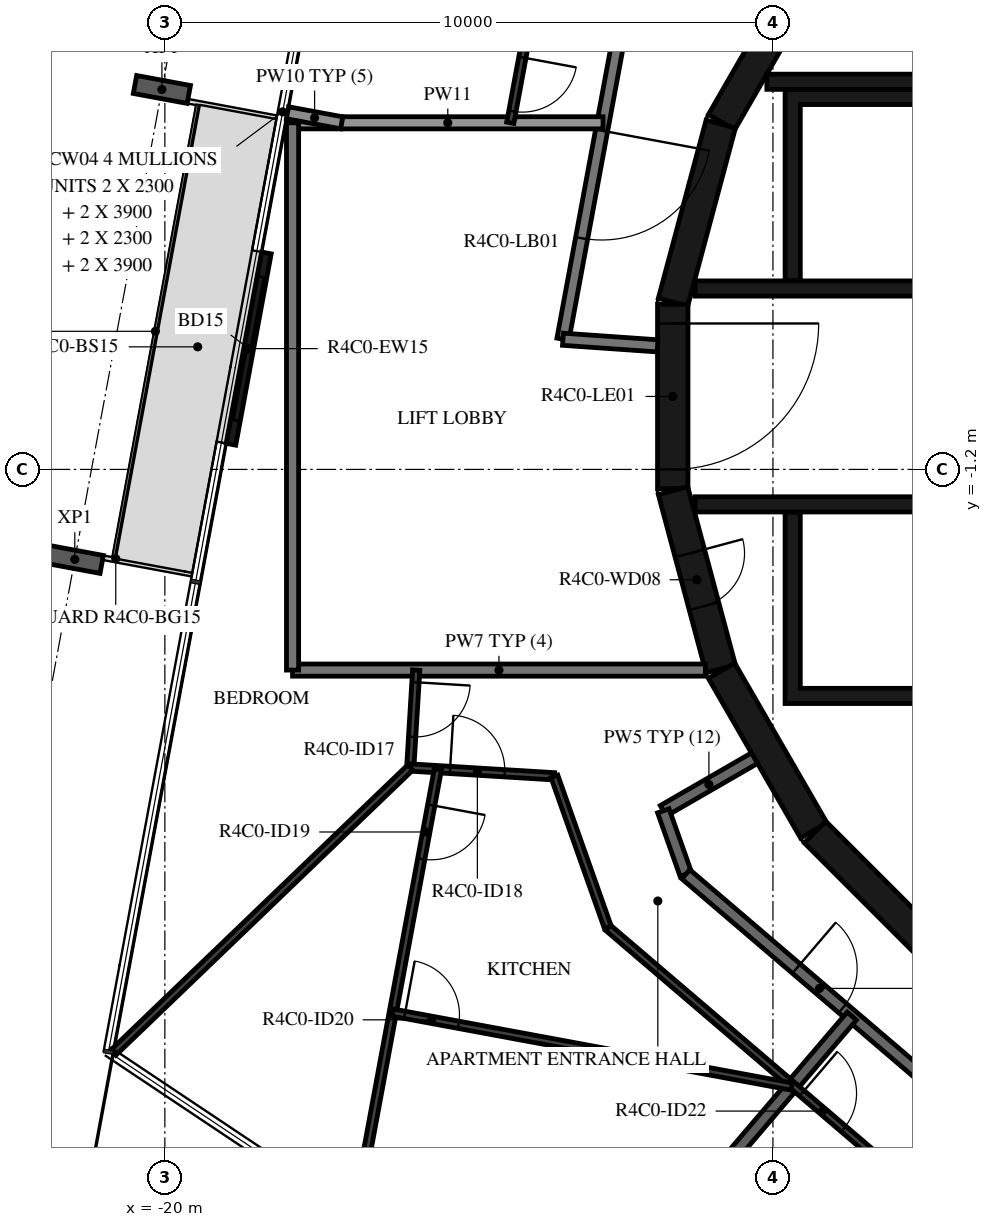
"""IFC4 building model, lengths in metres.
Left out: names, types, materials, properties, quantities, classifications, styles, units other than length and angle.
Written with IfcOpenShell. Run it as: python <this file> out.ifc"""

import sys

from ifc_helpers import new_model, si_unit, direction, frame, frame_2d, origin, origin_2d, place, context, subcontext, project, spatial, polyline, rectangle, i_section, outline, extrude, element, fill, save


model = new_model("IFC4")
c1 = context("Model", 3, precision=1e-05, world=origin(), true_north=direction((0.0, 1.0)))
c2 = subcontext(c1, "Body", "Model", "MODEL_VIEW")
j1 = project(units=[si_unit("LENGTHUNIT", "METRE"), si_unit("PLANEANGLEUNIT", "RADIAN")], contexts=[c1])
p1 = place(None, origin())
s1 = spatial("IfcSite", under=j1, at=p1, CompositionType="ELEMENT")
p2 = place(p1, origin())
s2 = spatial("IfcBuilding", under=s1, at=p2, CompositionType="ELEMENT")
p3 = place(p2, frame((0.0, 0.0, 172.7)))
s3 = spatial("IfcBuildingStorey", under=s2, at=p3, CompositionType="ELEMENT", Elevation=172.7)
for number, where, z_axis, x_axis in (
    (1, (-20.049, 5.048, -0.38), (0.0, 0.0, 1.0), (0.182, 0.983, 0.0)),
    (2, (-21.481, -2.68, -0.38), (0.0, 0.0, 1.0), (0.182, 0.983, 0.0)),
):
    element("IfcColumn", number, at=place(p3, frame(where, z_axis=z_axis, x_axis=x_axis)), inside=s3, PredefinedType="COLUMN", context=c2, shape_type="SweptSolid", body=[
        extrude(i_section(OverallWidth=0.3, OverallDepth=0.9, WebThickness=0.019, FlangeThickness=0.035, FilletRadius=0.03, at=origin_2d()), origin(), (0.0, 0.0, 1.0), 3.5),
    ])
p4 = place(p3, frame((-18.33, 2.36, 0.0), z_axis=(0.0, 0.0, 1.0), x_axis=(-0.18226136951, -0.983250117307, 0.0)))
e3 = element("IfcWall", 3, at=p4, inside=s3, PredefinedType="STANDARD", context=c2, shape_type="SweptSolid", body=[
    extrude(rectangle(XDim=3.2, YDim=0.16, at=frame_2d((1.6, 0.0))), origin(), (0.0, 0.0, 1.0), 3.12),
])
p5 = place(p4, frame((0.4, 0.0, 0.0)))
e4 = element("IfcOpeningElement", 4, at=p5, cuts=e3, PredefinedType="OPENING", context=c2, shape_type="SweptSolid", body=[
    extrude(rectangle(XDim=2.4, YDim=2.4, at=frame_2d((1.2, 1.2))), frame((0.0, 0.09, 0.0), z_axis=(0.0, -1.0, 0.0), x_axis=(1.0, 0.0, 0.0)), (0.0, 0.0, 1.0), 0.18),
])
for number, where, z_axis, x_axis in (
    (5, (-9.329, 7.137, 0.0), (0.0, 0.0, 1.0), (-0.5, -0.866, 0.0)),
    (6, (-10.858, 4.479, 0.0), (0.0, 0.0, 1.0), (-0.259, -0.966, 0.0)),
):
    element("IfcWall", number, at=place(p3, frame(where, z_axis=z_axis, x_axis=x_axis)), inside=s3, PredefinedType="SHEAR", context=c2, shape_type="SweptSolid", body=[
        extrude(rectangle(XDim=3.033, YDim=0.5, at=frame_2d((1.516, 0.0))), origin(), (0.0, 0.0, 1.0), 3.12),
    ])
p6 = place(p3, frame((-11.647, 1.516, 0.0), z_axis=(0.0, 0.0, 1.0), x_axis=(0.0, -1.0, 0.0)))
e7 = element("IfcWall", 7, at=p6, inside=s3, PredefinedType="SHEAR", context=c2, shape_type="SweptSolid", body=[
    extrude(rectangle(XDim=3.033, YDim=0.5, at=frame_2d((1.516, 0.0))), origin(), (0.0, 0.0, 1.0), 3.12),
])
p7 = place(p6, frame((0.316, 0.0, 0.0)))
e8 = element("IfcOpeningElement", 8, at=p7, cuts=e7, PredefinedType="OPENING", context=c2, shape_type="SweptSolid", body=[
    extrude(rectangle(XDim=2.4, YDim=2.1, at=frame_2d((1.2, 1.05))), frame((0.0, 0.26, 0.0), z_axis=(0.0, -1.0, 0.0), x_axis=(1.0, 0.0, 0.0)), (0.0, 0.0, 1.0), 0.52),
])
p8 = place(p3, frame((-11.643, -1.55, 0.0), z_axis=(0.0, 0.0, 1.0), x_axis=(0.258734743916, -0.965948410781, 0.0)))
e9 = element("IfcWall", 9, at=p8, inside=s3, PredefinedType="SHEAR", context=c2, shape_type="SweptSolid", body=[
    extrude(rectangle(XDim=3.033, YDim=0.5, at=frame_2d((1.516, 0.0))), origin(), (0.0, 0.0, 1.0), 3.12),
])
p9 = place(p8, frame((1.066, 0.0, 0.0)))
e10 = element("IfcOpeningElement", 10, at=p9, cuts=e9, PredefinedType="OPENING", context=c2, shape_type="SweptSolid", body=[
    extrude(rectangle(XDim=0.9, YDim=2.1, at=frame_2d((0.45, 1.05))), frame((0.0, 0.26, 0.0), z_axis=(0.0, -1.0, 0.0), x_axis=(1.0, 0.0, 0.0)), (0.0, 0.0, 1.0), 0.52),
])
p10 = place(p3, frame((-10.845, -4.51, 0.0), z_axis=(0.0, 0.0, 1.0), x_axis=(0.500087131594, -0.865975092491, 0.0)))
e11 = element("IfcWall", 11, at=p10, inside=s3, PredefinedType="SHEAR", context=c2, shape_type="SweptSolid", body=[
    extrude(rectangle(XDim=3.033, YDim=0.5, at=frame_2d((1.516, 0.0))), origin(), (0.0, 0.0, 1.0), 3.12),
])
p11 = place(p3, frame((-9.308, -7.164, 0.0), z_axis=(0.0, 0.0, 1.0), x_axis=(0.707106781187, -0.707106781187, 0.0)))
e12 = element("IfcWall", 12, at=p11, inside=s3, PredefinedType="SHEAR", context=c2, shape_type="SweptSolid", body=[
    extrude(rectangle(XDim=3.032, YDim=0.5, at=frame_2d((1.516, 0.0))), origin(), (0.0, 0.0, 1.0), 3.12),
])
p12 = place(p3, frame((-7.0, 5.175, 0.0), z_axis=(0.0, 0.0, 1.0), x_axis=(-1.0, 0.0, 0.0)))
e13 = element("IfcWall", 13, at=p12, inside=s3, PredefinedType="SHEAR", context=c2, shape_type="SweptSolid", body=[
    extrude(rectangle(XDim=3.1, YDim=0.25, at=frame_2d((1.55, 0.0))), origin(), (0.0, 0.0, 1.0), 3.12),
])
p13 = place(p3, origin())
e14 = element("IfcWall", 14, at=p13, inside=s3, PredefinedType="SHEAR", context=c2, shape_type="SweptSolid", body=[
    extrude(outline(polyline([(-9.55, 4.8), (-1.2, 4.8), (-1.2, 1.9), (-0.95, 1.9), (-0.95, 4.8), (0.95, 4.8), (0.95, 1.9), (1.2, 1.9), (1.2, 4.8), (3.1, 4.8), (3.1, 1.9), (3.35, 1.9), (3.35, 4.8), (5.25, 4.8), (5.25, 1.9), (5.5, 1.9), (5.5, 4.8), (7.4, 4.8), (7.4, 1.9), (7.65, 1.9), (7.65, 4.8), (9.55, 4.8), (9.55, 1.9), (9.8, 1.9), (9.8, 4.8), (9.8, 5.05), (-9.8, 5.05), (-9.8, 4.8), (-9.8, 1.9), (-9.55, 1.9), (-9.55, 4.8)])), origin(), (0.0, 0.0, 1.0), 3.12),
])
p14 = place(p3, origin())
e15 = element("IfcWall", 15, at=p14, inside=s3, PredefinedType="SHEAR", context=c2, shape_type="SweptSolid", body=[
    extrude(outline(polyline([(9.8, -5.05), (9.8, -4.8), (9.8, -1.9), (9.55, -1.9), (9.55, -4.8), (7.65, -4.8), (7.65, -1.9), (7.4, -1.9), (7.4, -4.8), (5.5, -4.8), (5.5, -1.9), (5.25, -1.9), (5.25, -4.8), (3.35, -4.8), (3.35, -1.9), (3.1, -1.9), (3.1, -4.8), (1.2, -4.8), (1.2, -1.9), (0.95, -1.9), (0.95, -4.8), (-5.25, -4.8), (-5.25, -1.9), (-5.5, -1.9), (-5.5, -4.8), (-7.4, -4.8), (-7.4, -1.9), (-7.65, -1.9), (-7.65, -4.8), (-9.55, -4.8), (-9.55, -1.9), (-9.8, -1.9), (-9.8, -4.8), (-9.8, -5.05), (9.8, -5.05)])), origin(), (0.0, 0.0, 1.0), 3.12),
])
p15 = place(p3, frame((-11.28, 1.775, 0.0), z_axis=(0.0, 0.0, 1.0), x_axis=(1.0, 0.0, 0.0)))
e16 = element("IfcWall", 16, at=p15, inside=s3, PredefinedType="SHEAR", context=c2, shape_type="SweptSolid", body=[
    extrude(rectangle(XDim=14.38, YDim=0.25, at=frame_2d((7.19, 0.0))), origin(), (0.0, 0.0, 1.0), 3.12),
])
p16 = place(p15, frame((10.73, 0.0, 0.0)))
e17 = element("IfcOpeningElement", 17, at=p16, cuts=e16, PredefinedType="OPENING", context=c2, shape_type="SweptSolid", body=[
    extrude(rectangle(XDim=1.1, YDim=2.1, at=frame_2d((0.55, 1.05))), frame((0.0, 0.135, 0.0), z_axis=(0.0, -1.0, 0.0), x_axis=(1.0, 0.0, 0.0)), (0.0, 0.0, 1.0), 0.27),
])
p17 = place(p15, frame((12.88, 0.0, 0.0)))
e18 = element("IfcOpeningElement", 18, at=p17, cuts=e16, PredefinedType="OPENING", context=c2, shape_type="SweptSolid", body=[
    extrude(rectangle(XDim=1.1, YDim=2.1, at=frame_2d((0.55, 1.05))), frame((0.0, 0.135, 0.0), z_axis=(0.0, -1.0, 0.0), x_axis=(1.0, 0.0, 0.0)), (0.0, 0.0, 1.0), 0.27),
])
p18 = place(p15, frame((5.455, 0.0, 0.0)))
e19 = element("IfcOpeningElement", 19, at=p18, cuts=e16, PredefinedType="OPENING", context=c2, shape_type="SweptSolid", body=[
    extrude(rectangle(XDim=0.9, YDim=2.1, at=frame_2d((0.45, 1.05))), frame((0.0, 0.135, 0.0), z_axis=(0.0, -1.0, 0.0), x_axis=(1.0, 0.0, 0.0)), (0.0, 0.0, 1.0), 0.27),
])
p19 = place(p3, frame((-11.28, -1.775, 0.0), z_axis=(0.0, 0.0, 1.0), x_axis=(1.0, 0.0, 0.0)))
e20 = element("IfcWall", 20, at=p19, inside=s3, PredefinedType="SHEAR", context=c2, shape_type="SweptSolid", body=[
    extrude(rectangle(XDim=14.38, YDim=0.25, at=frame_2d((7.19, 0.0))), origin(), (0.0, 0.0, 1.0), 3.12),
])
p20 = place(p19, frame((12.88, 0.0, 0.0)))
e21 = element("IfcOpeningElement", 21, at=p20, cuts=e20, PredefinedType="OPENING", context=c2, shape_type="SweptSolid", body=[
    extrude(rectangle(XDim=1.1, YDim=2.1, at=frame_2d((0.55, 1.05))), frame((0.0, 0.135, 0.0), z_axis=(0.0, -1.0, 0.0), x_axis=(1.0, 0.0, 0.0)), (0.0, 0.0, 1.0), 0.27),
])
p21 = place(p19, frame((8.68, 0.0, 0.0)))
e22 = element("IfcOpeningElement", 22, at=p21, cuts=e20, PredefinedType="OPENING", context=c2, shape_type="SweptSolid", body=[
    extrude(rectangle(XDim=0.9, YDim=2.1, at=frame_2d((0.45, 1.05))), frame((0.0, 0.135, 0.0), z_axis=(0.0, -1.0, 0.0), x_axis=(1.0, 0.0, 0.0)), (0.0, 0.0, 1.0), 0.27),
])
p22 = place(p3, frame((-12.521, 5.972, 0.0), z_axis=(0.0, 0.0, 1.0), x_axis=(-0.182251559718, -0.983251935661, 0.0)))
e23 = element("IfcWall", 23, at=p22, inside=s3, PredefinedType="STANDARD", context=c2, shape_type="SweptSolid", body=[
    extrude(rectangle(XDim=5.117, YDim=0.2, at=frame_2d((2.559, 0.0))), origin(), (0.0, 0.0, 1.0), 3.12),
])
p23 = place(p22, frame((1.627, 0.0, 0.0)))
e24 = element("IfcOpeningElement", 24, at=p23, cuts=e23, PredefinedType="OPENING", context=c2, shape_type="SweptSolid", body=[
    extrude(rectangle(XDim=1.8, YDim=2.1, at=frame_2d((0.9, 1.05))), frame((0.0, 0.11, 0.0), z_axis=(0.0, -1.0, 0.0), x_axis=(1.0, 0.0, 0.0)), (0.0, 0.0, 1.0), 0.22),
])
p24 = place(p3, frame((-13.454, 0.941, 0.0), z_axis=(0.0, 0.0, 1.0), x_axis=(0.99755155062, -0.069934997354, 0.0)))
e25 = element("IfcWall", 25, at=p24, inside=s3, PredefinedType="STANDARD", context=c2, shape_type="SweptSolid", body=[
    extrude(rectangle(XDim=1.561, YDim=0.2, at=frame_2d((0.78, 0.0))), origin(), (0.0, 0.0, 1.0), 3.12),
])
p25 = place(p3, frame((-10.303, -5.949, 0.0), z_axis=(0.0, 0.0, 1.0), x_axis=(-0.866021168401, -0.500007335828, 0.0)))
e26 = element("IfcWall", 26, at=p25, inside=s3, PredefinedType="STANDARD", context=c2, shape_type="SweptSolid", body=[
    extrude(rectangle(XDim=1.731, YDim=0.2, at=frame_2d((0.865, 0.0))), origin(), (0.0, 0.0, 1.0), 3.12),
])
p26 = place(p3, frame((-11.802, -6.814, 0.0), z_axis=(0.0, 0.0, 1.0), x_axis=(0.333904297771, -0.942606980629, 0.0)))
e27 = element("IfcWall", 27, at=p26, inside=s3, PredefinedType="STANDARD", context=c2, shape_type="SweptSolid", body=[
    extrude(rectangle(XDim=1.107, YDim=0.2, at=frame_2d((0.553, 0.0))), origin(), (0.0, 0.0, 1.0), 3.12),
])
p27 = place(p3, frame((-11.433, -7.858, 0.0), z_axis=(0.0, 0.0, 1.0), x_axis=(0.760412154545, -0.649440801937, 0.0)))
e28 = element("IfcWall", 28, at=p27, inside=s3, PredefinedType="STANDARD", context=c2, shape_type="SweptSolid", body=[
    extrude(rectangle(XDim=7.181, YDim=0.2, at=frame_2d((3.59, 0.0))), origin(), (0.0, 0.0, 1.0), 3.12),
])
p28 = place(p27, frame((2.39, 0.0, 0.0)))
e29 = element("IfcOpeningElement", 29, at=p28, cuts=e28, PredefinedType="OPENING", context=c2, shape_type="SweptSolid", body=[
    extrude(rectangle(XDim=1.0, YDim=2.1, at=frame_2d((0.5, 1.05))), frame((0.0, 0.11, 0.0), z_axis=(0.0, -1.0, 0.0), x_axis=(1.0, 0.0, 0.0)), (0.0, 0.0, 1.0), 0.22),
])
p29 = place(p3, frame((-12.794, 4.5, 0.0), z_axis=(0.0, 0.0, 1.0), x_axis=(-1.0, 0.0, 0.0)))
e30 = element("IfcWall", 30, at=p29, inside=s3, PredefinedType="STANDARD", context=c2, shape_type="SweptSolid", body=[
    extrude(rectangle(XDim=5.106, YDim=0.2, at=frame_2d((2.553, 0.0))), origin(), (0.0, 0.0, 1.0), 2.73),
])
p30 = place(p3, frame((-17.9, -4.5, 0.0), z_axis=(0.0, 0.0, 1.0), x_axis=(1.0, 0.0, 0.0)))
e31 = element("IfcWall", 31, at=p30, inside=s3, PredefinedType="STANDARD", context=c2, shape_type="SweptSolid", body=[
    extrude(rectangle(XDim=6.789, YDim=0.2, at=frame_2d((3.394, 0.0))), origin(), (0.0, 0.0, 1.0), 3.12),
])
p31 = place(p3, frame((-17.9, 4.5, 0.0), z_axis=(0.0, 0.0, 1.0), x_axis=(0.0, -1.0, 0.0)))
e32 = element("IfcWall", 32, at=p31, inside=s3, PredefinedType="STANDARD", context=c2, shape_type="SweptSolid", body=[
    extrude(rectangle(XDim=9.0, YDim=0.2, at=frame_2d((4.5, 0.0))), origin(), (0.0, 0.0, 1.0), 3.12),
])
p32 = place(p3, frame((-17.984, 4.665, 0.0), z_axis=(0.0, 0.0, 1.0), x_axis=(0.98328378843, -0.182079629313, 0.0)))
e33 = element("IfcWall", 33, at=p32, inside=s3, PredefinedType="STANDARD", context=c2, shape_type="SweptSolid", body=[
    extrude(rectangle(XDim=0.908, YDim=0.2, at=frame_2d((0.454, 0.0))), origin(), (0.0, 0.0, 1.0), 2.73),
])
p33 = place(p3, frame((-11.838, -13.86, 0.0), z_axis=(0.0, 0.0, 1.0), x_axis=(0.64944503311, 0.760408540831, 0.0)))
e34 = element("IfcWall", 34, at=p33, inside=s3, PredefinedType="STANDARD", context=c2, shape_type="SweptSolid", body=[
    extrude(rectangle(XDim=4.827, YDim=0.2, at=frame_2d((2.414, 0.0))), origin(), (0.0, 0.0, 1.0), 3.12),
])
p34 = place(p3, frame((-13.923, 6.641, 0.0), z_axis=(0.0, 0.0, 1.0), x_axis=(-0.182209715759, -0.983259690765, 0.0)))
e35 = element("IfcWall", 35, at=p34, inside=s3, PredefinedType="PARTITIONING", context=c2, shape_type="SweptSolid", body=[
    extrude(rectangle(XDim=2.177, YDim=0.12, at=frame_2d((1.089, 0.0))), origin(), (0.0, 0.0, 1.0), 3.12),
])
p35 = place(p34, frame((1.083, 0.0, 0.0)))
e36 = element("IfcOpeningElement", 36, at=p35, cuts=e35, PredefinedType="OPENING", context=c2, shape_type="SweptSolid", body=[
    extrude(rectangle(XDim=0.9, YDim=2.1, at=frame_2d((0.45, 1.05))), frame((0.0, 0.07, 0.0), z_axis=(0.0, -1.0, 0.0), x_axis=(1.0, 0.0, 0.0)), (0.0, 0.0, 1.0), 0.14),
])
p36 = place(p3, frame((-15.866, -4.5, 0.0), z_axis=(0.0, 0.0, 1.0), x_axis=(-0.060986374837, -0.998138598635, 0.0)))
e37 = element("IfcWall", 37, at=p36, inside=s3, PredefinedType="PARTITIONING", context=c2, shape_type="SweptSolid", body=[
    extrude(rectangle(XDim=1.605, YDim=0.12, at=frame_2d((0.803, 0.0))), origin(), (0.0, 0.0, 1.0), 3.12),
])
p37 = place(p36, frame((0.2, 0.0, 0.0)))
e38 = element("IfcOpeningElement", 38, at=p37, cuts=e37, PredefinedType="OPENING", context=c2, shape_type="SweptSolid", body=[
    extrude(rectangle(XDim=0.9, YDim=2.1, at=frame_2d((0.45, 1.05))), frame((0.0, 0.07, 0.0), z_axis=(0.0, -1.0, 0.0), x_axis=(1.0, 0.0, 0.0)), (0.0, 0.0, 1.0), 0.14),
])
p38 = place(p3, frame((-15.964, -6.102, 0.0), z_axis=(0.0, 0.0, 1.0), x_axis=(0.998145469708, -0.060873814574, 0.0)))
e39 = element("IfcWall", 39, at=p38, inside=s3, PredefinedType="PARTITIONING", context=c2, shape_type="SweptSolid", body=[
    extrude(rectangle(XDim=2.374, YDim=0.12, at=frame_2d((1.187, 0.0))), origin(), (0.0, 0.0, 1.0), 3.12),
])
p39 = place(p38, frame((0.656, 0.0, 0.0)))
e40 = element("IfcOpeningElement", 40, at=p39, cuts=e39, PredefinedType="OPENING", context=c2, shape_type="SweptSolid", body=[
    extrude(rectangle(XDim=0.9, YDim=2.1, at=frame_2d((0.45, 1.05))), frame((0.0, 0.07, 0.0), z_axis=(0.0, -1.0, 0.0), x_axis=(1.0, 0.0, 0.0)), (0.0, 0.0, 1.0), 0.14),
])
p40 = place(p3, frame((-13.594, -6.247, 0.0), z_axis=(0.0, 0.0, 1.0), x_axis=(0.333777006894, -0.942652061828, 0.0)))
e41 = element("IfcWall", 41, at=p40, inside=s3, PredefinedType="PARTITIONING", context=c2, shape_type="SweptSolid", body=[
    extrude(rectangle(XDim=2.642, YDim=0.12, at=frame_2d((1.321, 0.0))), origin(), (0.0, 0.0, 1.0), 3.12),
])
p41 = place(p3, frame((-12.713, -8.737, 0.0), z_axis=(0.0, 0.0, 1.0), x_axis=(0.760432387723, -0.649417110725, 0.0)))
e42 = element("IfcWall", 42, at=p41, inside=s3, PredefinedType="PARTITIONING", context=c2, shape_type="SweptSolid", body=[
    extrude(rectangle(XDim=6.032, YDim=0.12, at=frame_2d((3.016, 0.0))), origin(), (0.0, 0.0, 1.0), 3.12),
])
p42 = place(p41, frame((4.192, 0.0, 0.0)))
e43 = element("IfcOpeningElement", 43, at=p42, cuts=e42, PredefinedType="OPENING", context=c2, shape_type="SweptSolid", body=[
    extrude(rectangle(XDim=0.9, YDim=2.1, at=frame_2d((0.45, 1.05))), frame((0.0, 0.07, 0.0), z_axis=(0.0, -1.0, 0.0), x_axis=(1.0, 0.0, 0.0)), (0.0, 0.0, 1.0), 0.14),
])
p43 = place(p3, frame((-20.849, -10.792, 0.0), z_axis=(0.0, 0.0, 1.0), x_axis=(0.721364983662, 0.692555095531, 0.0)))
e44 = element("IfcWall", 44, at=p43, inside=s3, PredefinedType="PARTITIONING", context=c2, shape_type="SweptSolid", body=[
    extrude(rectangle(XDim=6.771, YDim=0.12, at=frame_2d((3.385, 0.0))), origin(), (0.0, 0.0, 1.0), 3.12),
])
p44 = place(p3, frame((-15.51, -6.13, 0.0), z_axis=(0.0, 0.0, 1.0), x_axis=(-0.182243361628, -0.98325345519, 0.0)))
e45 = element("IfcWall", 45, at=p44, inside=s3, PredefinedType="PARTITIONING", context=c2, shape_type="SweptSolid", body=[
    extrude(rectangle(XDim=9.134, YDim=0.12, at=frame_2d((4.567, 0.0))), origin(), (0.0, 0.0, 1.0), 3.12),
])
p45 = place(p44, frame((0.6, 0.0, 0.0)))
e46 = element("IfcOpeningElement", 46, at=p45, cuts=e45, PredefinedType="OPENING", context=c2, shape_type="SweptSolid", body=[
    extrude(rectangle(XDim=0.9, YDim=2.1, at=frame_2d((0.45, 1.05))), frame((0.0, 0.07, 0.0), z_axis=(0.0, -1.0, 0.0), x_axis=(1.0, 0.0, 0.0)), (0.0, 0.0, 1.0), 0.14),
])
p46 = place(p3, frame((-16.252, -10.133, 0.0), z_axis=(0.0, 0.0, 1.0), x_axis=(0.983256998026, -0.182224246005, 0.0)))
e47 = element("IfcWall", 47, at=p46, inside=s3, PredefinedType="PARTITIONING", context=c2, shape_type="SweptSolid", body=[
    extrude(rectangle(XDim=6.671, YDim=0.12, at=frame_2d((3.335, 0.0))), origin(), (0.0, 0.0, 1.0), 3.12),
])
p47 = place(p46, frame((0.2, 0.0, 0.0)))
e48 = element("IfcOpeningElement", 48, at=p47, cuts=e47, PredefinedType="OPENING", context=c2, shape_type="SweptSolid", body=[
    extrude(rectangle(XDim=0.9, YDim=2.1, at=frame_2d((0.45, 1.05))), frame((0.0, 0.07, 0.0), z_axis=(0.0, -1.0, 0.0), x_axis=(1.0, 0.0, 0.0)), (0.0, 0.0, 1.0), 0.14),
])
p48 = place(p5, origin())
e49 = element("IfcDoor", 49, at=p48, inside=s3, OperationType="DOUBLE_DOOR_SLIDING", PredefinedType="DOOR", context=c2, shape_type="SweptSolid", body=[
    extrude(rectangle(XDim=2.4, YDim=2.4, at=frame_2d((1.2, 1.2))), frame((0.0, 0.025, 0.0), z_axis=(0.0, -1.0, 0.0), x_axis=(1.0, 0.0, 0.0)), (0.0, 0.0, 1.0), 0.05),
])
fill(e4, e49)
p49 = place(p7, origin())
e50 = element("IfcDoor", 50, at=p49, inside=s3, OperationType="DOUBLE_DOOR_SINGLE_SWING", PredefinedType="DOOR", context=c2, shape_type="SweptSolid", body=[
    extrude(rectangle(XDim=2.4, YDim=2.1, at=frame_2d((1.2, 1.05))), frame((0.0, 0.025, 0.0), z_axis=(0.0, -1.0, 0.0), x_axis=(1.0, 0.0, 0.0)), (0.0, 0.0, 1.0), 0.05),
])
fill(e8, e50)
p50 = place(p9, origin())
e51 = element("IfcDoor", 51, at=p50, inside=s3, OperationType="SINGLE_SWING_RIGHT", PredefinedType="DOOR", context=c2, shape_type="SweptSolid", body=[
    extrude(rectangle(XDim=0.9, YDim=2.1, at=frame_2d((0.45, 1.05))), frame((0.0, 0.025, 0.0), z_axis=(0.0, -1.0, 0.0), x_axis=(1.0, 0.0, 0.0)), (0.0, 0.0, 1.0), 0.05),
])
fill(e10, e51)
p51 = place(p35, origin())
e52 = element("IfcDoor", 52, at=p51, inside=s3, OperationType="SINGLE_SWING_LEFT", PredefinedType="DOOR", context=c2, shape_type="SweptSolid", body=[
    extrude(rectangle(XDim=0.9, YDim=2.1, at=frame_2d((0.45, 1.05))), frame((0.0, 0.025, 0.0), z_axis=(0.0, -1.0, 0.0), x_axis=(1.0, 0.0, 0.0)), (0.0, 0.0, 1.0), 0.05),
])
fill(e36, e52)
p52 = place(p28, origin())
e53 = element("IfcDoor", 53, at=p52, inside=s3, OperationType="SINGLE_SWING_RIGHT", PredefinedType="DOOR", context=c2, shape_type="SweptSolid", body=[
    extrude(rectangle(XDim=1.0, YDim=2.1, at=frame_2d((0.5, 1.05))), frame((0.0, 0.025, 0.0), z_axis=(0.0, -1.0, 0.0), x_axis=(1.0, 0.0, 0.0)), (0.0, 0.0, 1.0), 0.05),
])
fill(e29, e53)
p53 = place(p37, origin())
e54 = element("IfcDoor", 54, at=p53, inside=s3, OperationType="SINGLE_SWING_RIGHT", PredefinedType="DOOR", context=c2, shape_type="SweptSolid", body=[
    extrude(rectangle(XDim=0.9, YDim=2.1, at=frame_2d((0.45, 1.05))), frame((0.0, 0.025, 0.0), z_axis=(0.0, -1.0, 0.0), x_axis=(1.0, 0.0, 0.0)), (0.0, 0.0, 1.0), 0.05),
])
fill(e38, e54)
p54 = place(p39, origin())
e55 = element("IfcDoor", 55, at=p54, inside=s3, OperationType="SINGLE_SWING_RIGHT", PredefinedType="DOOR", context=c2, shape_type="SweptSolid", body=[
    extrude(rectangle(XDim=0.9, YDim=2.1, at=frame_2d((0.45, 1.05))), frame((0.0, 0.025, 0.0), z_axis=(0.0, -1.0, 0.0), x_axis=(1.0, 0.0, 0.0)), (0.0, 0.0, 1.0), 0.05),
])
fill(e40, e55)
p55 = place(p45, origin())
e56 = element("IfcDoor", 56, at=p55, inside=s3, OperationType="SINGLE_SWING_RIGHT", PredefinedType="DOOR", context=c2, shape_type="SweptSolid", body=[
    extrude(rectangle(XDim=0.9, YDim=2.1, at=frame_2d((0.45, 1.05))), frame((0.0, 0.025, 0.0), z_axis=(0.0, -1.0, 0.0), x_axis=(1.0, 0.0, 0.0)), (0.0, 0.0, 1.0), 0.05),
])
fill(e46, e56)
p56 = place(p47, origin())
e57 = element("IfcDoor", 57, at=p56, inside=s3, OperationType="SINGLE_SWING_RIGHT", PredefinedType="DOOR", context=c2, shape_type="SweptSolid", body=[
    extrude(rectangle(XDim=0.9, YDim=2.1, at=frame_2d((0.45, 1.05))), frame((0.0, 0.025, 0.0), z_axis=(0.0, -1.0, 0.0), x_axis=(1.0, 0.0, 0.0)), (0.0, 0.0, 1.0), 0.05),
])
fill(e48, e57)
p57 = place(p42, origin())
e58 = element("IfcDoor", 58, at=p57, inside=s3, OperationType="SINGLE_SWING_LEFT", PredefinedType="DOOR", context=c2, shape_type="SweptSolid", body=[
    extrude(rectangle(XDim=0.9, YDim=2.1, at=frame_2d((0.45, 1.05))), frame((0.0, 0.025, 0.0), z_axis=(0.0, -1.0, 0.0), x_axis=(1.0, 0.0, 0.0)), (0.0, 0.0, 1.0), 0.05),
])
fill(e43, e58)
p58 = place(p23, origin())
e59 = element("IfcDoor", 59, at=p58, inside=s3, OperationType="DOUBLE_DOOR_SINGLE_SWING", PredefinedType="DOOR", context=c2, shape_type="SweptSolid", body=[
    extrude(rectangle(XDim=1.8, YDim=2.1, at=frame_2d((0.9, 1.05))), frame((0.0, 0.025, 0.0), z_axis=(0.0, -1.0, 0.0), x_axis=(1.0, 0.0, 0.0)), (0.0, 0.0, 1.0), 0.05),
])
fill(e24, e59)
save(model, sys.argv[1])
